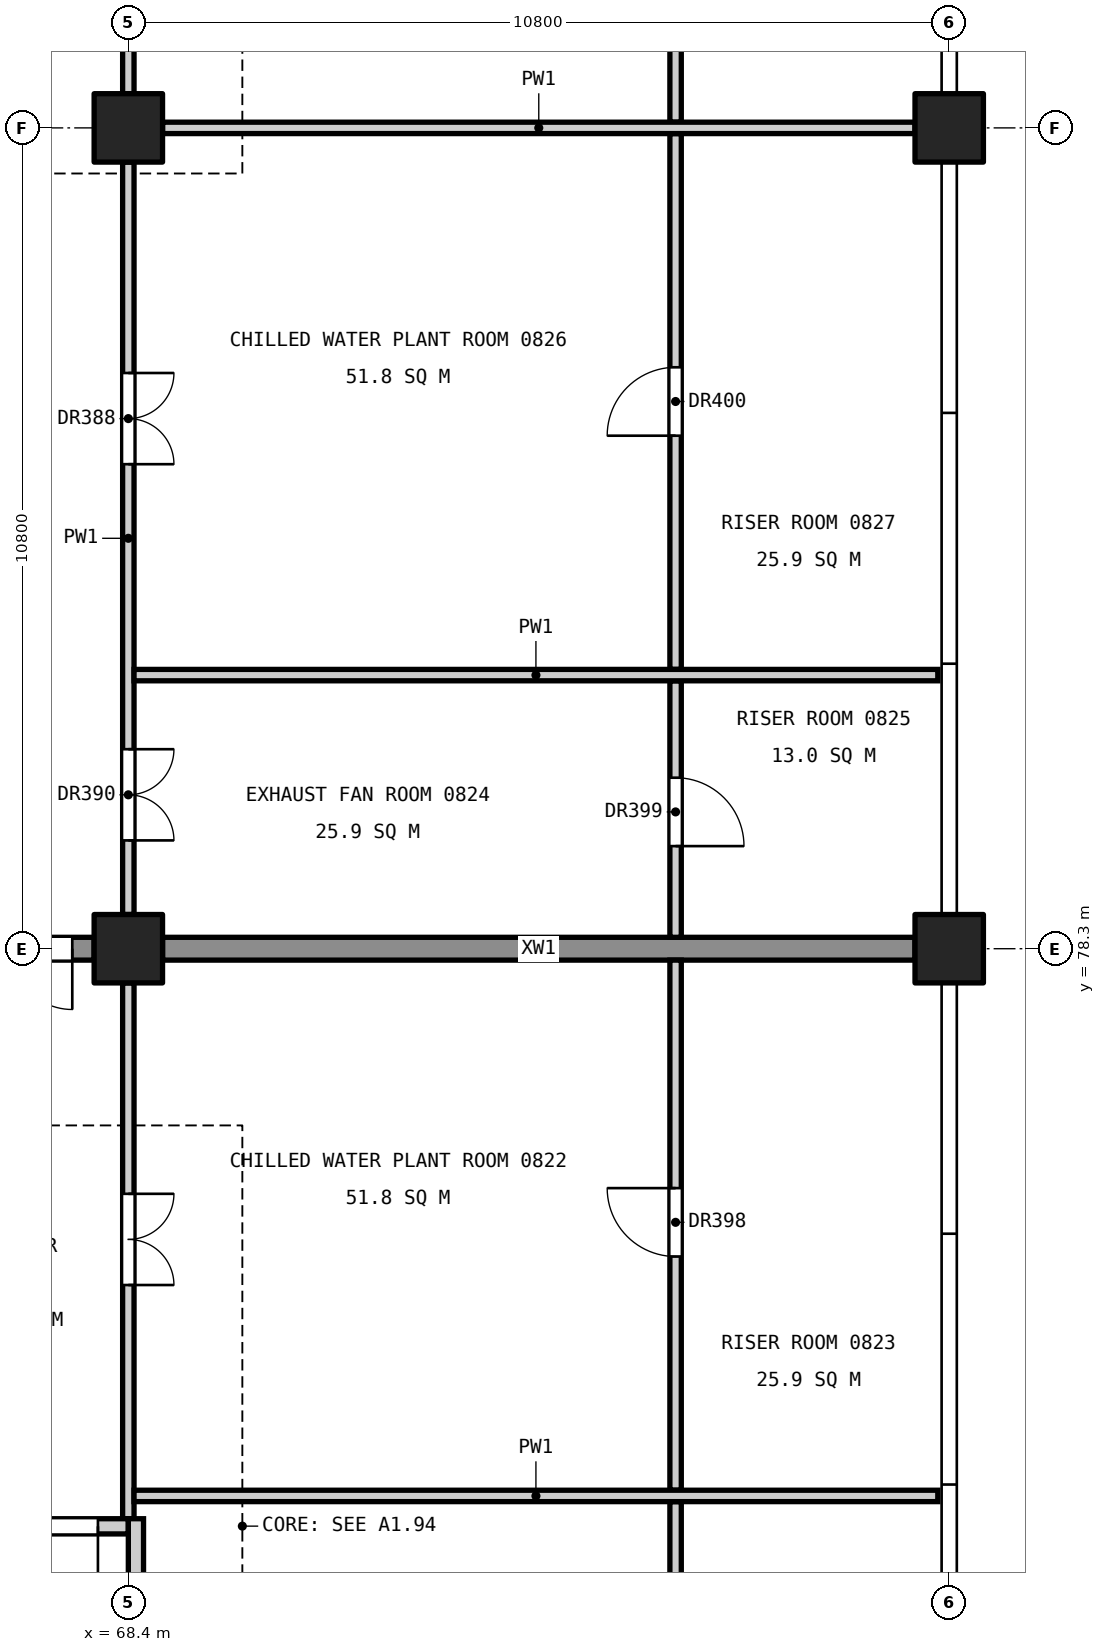
"""IFC4 building model, lengths in metres.
Left out: names, types, materials, properties, quantities, classifications, styles, units other than length and angle.
Written with IfcOpenShell. Run it as: python <this file> out.ifc"""

import sys

from ifc_helpers import new_model, si_unit, direction, frame, frame_2d, origin, origin_2d, place, context, subcontext, project, spatial, rectangle, extrude, element, fill, save


model = new_model("IFC4")
c1 = context("Model", 3, precision=1e-05, world=origin(), true_north=direction((0.0, 1.0)))
c2 = subcontext(c1, "Body", "Model", "MODEL_VIEW")
j1 = project(units=[si_unit("LENGTHUNIT", "METRE"), si_unit("PLANEANGLEUNIT", "RADIAN")], contexts=[c1])
p1 = place(None, origin())
s1 = spatial("IfcSite", under=j1, at=p1, CompositionType="ELEMENT")
p2 = place(p1, origin())
s2 = spatial("IfcBuilding", under=s1, at=p2, CompositionType="ELEMENT")
p3 = place(p2, frame((0.0, 0.0, 41.4)))
s3 = spatial("IfcBuildingStorey", under=s2, at=p3, CompositionType="ELEMENT", Elevation=41.4)
for number, where, z_axis, x_axis in (
    (1, (68.4, 78.3, 0.0), (0.0, 0.0, 1.0), (1.0, 0.0, 0.0)),
    (2, (68.4, 89.1, 0.0), (0.0, 0.0, 1.0), (1.0, 0.0, 0.0)),
    (3, (79.2, 78.3, 0.0), (0.0, 0.0, 1.0), (1.0, 0.0, 0.0)),
    (4, (79.2, 89.1, 0.0), (0.0, 0.0, 1.0), (1.0, 0.0, 0.0)),
):
    element("IfcColumn", number, at=place(p3, frame(where, z_axis=z_axis, x_axis=x_axis)), inside=s3, PredefinedType="COLUMN", context=c2, shape_type="SweptSolid", body=[
        extrude(rectangle(XDim=0.9, YDim=0.9, at=origin_2d()), origin(), (0.0, 0.0, 1.0), 4.8),
    ])
p4 = place(p3, frame((61.65, 78.3, 0.0), z_axis=(0.0, 0.0, 1.0), x_axis=(1.0, 0.0, 0.0)))
e5 = element("IfcWall", 5, at=p4, inside=s3, PredefinedType="SHEAR", context=c2, shape_type="SweptSolid", body=[
    extrude(rectangle(XDim=6.3, YDim=0.3, at=frame_2d((3.15, 0.0))), origin(), (0.0, 0.0, 1.0), 4.55),
])
p5 = place(p4, frame((4.413, 0.0, 0.0)))
e6 = element("IfcOpeningElement", 6, at=p5, cuts=e5, PredefinedType="OPENING", context=c2, shape_type="SweptSolid", body=[
    extrude(rectangle(XDim=1.6, YDim=2.1, at=frame_2d((0.8, 1.05))), frame((0.0, 0.16, 0.0), z_axis=(0.0, -1.0, 0.0), x_axis=(1.0, 0.0, 0.0)), (0.0, 0.0, 1.0), 0.32),
])
p6 = place(p3, frame((68.85, 78.3, 0.0), z_axis=(0.0, 0.0, 1.0), x_axis=(1.0, 0.0, 0.0)))
e7 = element("IfcWall", 7, at=p6, inside=s3, PredefinedType="SHEAR", context=c2, shape_type="SweptSolid", body=[
    extrude(rectangle(XDim=9.9, YDim=0.3, at=frame_2d((4.95, 0.0))), origin(), (0.0, 0.0, 1.0), 4.55),
])
p7 = place(p3, frame((68.4, 70.8, 0.0), z_axis=(0.0, 0.0, 1.0), x_axis=(0.0, 1.0, 0.0)))
e8 = element("IfcWall", 8, at=p7, inside=s3, PredefinedType="PARTITIONING", context=c2, shape_type="SweptSolid", body=[
    extrude(rectangle(XDim=7.05, YDim=0.15, at=frame_2d((3.525, 0.0))), origin(), (0.0, 0.0, 1.0), 3.55),
])
p8 = place(p7, frame((3.075, 0.0, 0.0)))
e9 = element("IfcOpeningElement", 9, at=p8, cuts=e8, PredefinedType="OPENING", context=c2, shape_type="SweptSolid", body=[
    extrude(rectangle(XDim=1.2, YDim=2.1, at=frame_2d((0.6, 1.05))), frame((0.0, 0.085, 0.0), z_axis=(0.0, -1.0, 0.0), x_axis=(1.0, 0.0, 0.0)), (0.0, 0.0, 1.0), 0.17),
])
p9 = place(p3, frame((68.4, 78.75, 0.0), z_axis=(0.0, 0.0, 1.0), x_axis=(0.0, 1.0, 0.0)))
e10 = element("IfcWall", 10, at=p9, inside=s3, PredefinedType="PARTITIONING", context=c2, shape_type="SweptSolid", body=[
    extrude(rectangle(XDim=9.9, YDim=0.15, at=frame_2d((4.95, 0.0))), origin(), (0.0, 0.0, 1.0), 3.55),
])
p10 = place(p9, frame((5.925, 0.0, 0.0)))
e11 = element("IfcOpeningElement", 11, at=p10, cuts=e10, PredefinedType="OPENING", context=c2, shape_type="SweptSolid", body=[
    extrude(rectangle(XDim=1.2, YDim=2.1, at=frame_2d((0.6, 1.05))), frame((0.0, 0.085, 0.0), z_axis=(0.0, -1.0, 0.0), x_axis=(1.0, 0.0, 0.0)), (0.0, 0.0, 1.0), 0.17),
])
p11 = place(p9, frame((0.975, 0.0, 0.0)))
e12 = element("IfcOpeningElement", 12, at=p11, cuts=e10, PredefinedType="OPENING", context=c2, shape_type="SweptSolid", body=[
    extrude(rectangle(XDim=1.2, YDim=2.1, at=frame_2d((0.6, 1.05))), frame((0.0, 0.085, 0.0), z_axis=(0.0, -1.0, 0.0), x_axis=(1.0, 0.0, 0.0)), (0.0, 0.0, 1.0), 0.17),
])
p12 = place(p3, frame((68.4, 89.55, 0.0), z_axis=(0.0, 0.0, 1.0), x_axis=(0.0, 1.0, 0.0)))
e13 = element("IfcWall", 13, at=p12, inside=s3, PredefinedType="PARTITIONING", context=c2, shape_type="SweptSolid", body=[
    extrude(rectangle(XDim=3.55, YDim=0.15, at=frame_2d((1.775, 0.0))), origin(), (0.0, 0.0, 1.0), 3.55),
])
p13 = place(p12, frame((1.175, 0.0, 0.0)))
e14 = element("IfcOpeningElement", 14, at=p13, cuts=e13, PredefinedType="OPENING", context=c2, shape_type="SweptSolid", body=[
    extrude(rectangle(XDim=1.2, YDim=2.1, at=frame_2d((0.6, 1.05))), frame((0.0, 0.085, 0.0), z_axis=(0.0, -1.0, 0.0), x_axis=(1.0, 0.0, 0.0)), (0.0, 0.0, 1.0), 0.17),
])
p14 = place(p3, frame((65.9, 70.7, 0.0), z_axis=(0.0, 0.0, 1.0), x_axis=(1.0, 0.0, 0.0)))
e15 = element("IfcWall", 15, at=p14, inside=s3, PredefinedType="PARTITIONING", context=c2, shape_type="SweptSolid", body=[
    extrude(rectangle(XDim=2.5, YDim=0.2, at=frame_2d((1.25, 0.0))), origin(), (0.0, 0.0, 1.0), 3.55),
])
p15 = place(p14, frame((0.9, 0.0, 0.0)))
e16 = element("IfcOpeningElement", 16, at=p15, cuts=e15, PredefinedType="OPENING", context=c2, shape_type="SweptSolid", body=[
    extrude(rectangle(XDim=1.2, YDim=2.1, at=frame_2d((0.6, 1.05))), frame((0.0, 0.11, 0.0), z_axis=(0.0, -1.0, 0.0), x_axis=(1.0, 0.0, 0.0)), (0.0, 0.0, 1.0), 0.22),
])
p16 = place(p3, frame((68.5, 67.95, 0.0), z_axis=(0.0, 0.0, 1.0), x_axis=(0.0, 1.0, 0.0)))
e17 = element("IfcWall", 17, at=p16, inside=s3, PredefinedType="PARTITIONING", context=c2, shape_type="SweptSolid", body=[
    extrude(rectangle(XDim=2.85, YDim=0.2, at=frame_2d((1.425, 0.0))), origin(), (0.0, 0.0, 1.0), 3.55),
])
p17 = place(p3, frame((75.6, 56.85, 0.0), z_axis=(0.0, 0.0, 1.0), x_axis=(0.0, 1.0, 0.0)))
e18 = element("IfcWall", 18, at=p17, inside=s3, PredefinedType="PARTITIONING", context=c2, shape_type="SweptSolid", body=[
    extrude(rectangle(XDim=14.175, YDim=0.15, at=frame_2d((7.087, 0.0))), origin(), (0.0, 0.0, 1.0), 3.55),
])
p18 = place(p17, frame((6.6, 0.0, 0.0)))
e19 = element("IfcOpeningElement", 19, at=p18, cuts=e18, PredefinedType="OPENING", context=c2, shape_type="SweptSolid", body=[
    extrude(rectangle(XDim=0.9, YDim=2.1, at=frame_2d((0.45, 1.05))), frame((0.0, 0.085, 0.0), z_axis=(0.0, -1.0, 0.0), x_axis=(1.0, 0.0, 0.0)), (0.0, 0.0, 1.0), 0.17),
])
p19 = place(p3, frame((75.6, 71.175, 0.0), z_axis=(0.0, 0.0, 1.0), x_axis=(0.0, 1.0, 0.0)))
e20 = element("IfcWall", 20, at=p19, inside=s3, PredefinedType="PARTITIONING", context=c2, shape_type="SweptSolid", body=[
    extrude(rectangle(XDim=6.975, YDim=0.15, at=frame_2d((3.487, 0.0))), origin(), (0.0, 0.0, 1.0), 3.55),
])
p20 = place(p19, frame((3.075, 0.0, 0.0)))
e21 = element("IfcOpeningElement", 21, at=p20, cuts=e20, PredefinedType="OPENING", context=c2, shape_type="SweptSolid", body=[
    extrude(rectangle(XDim=0.9, YDim=2.1, at=frame_2d((0.45, 1.05))), frame((0.0, 0.085, 0.0), z_axis=(0.0, -1.0, 0.0), x_axis=(1.0, 0.0, 0.0)), (0.0, 0.0, 1.0), 0.17),
])
p21 = place(p3, frame((75.6, 78.45, 0.0), z_axis=(0.0, 0.0, 1.0), x_axis=(0.0, 1.0, 0.0)))
e22 = element("IfcWall", 22, at=p21, inside=s3, PredefinedType="PARTITIONING", context=c2, shape_type="SweptSolid", body=[
    extrude(rectangle(XDim=3.375, YDim=0.15, at=frame_2d((1.688, 0.0))), origin(), (0.0, 0.0, 1.0), 3.55),
])
p22 = place(p21, frame((1.2, 0.0, 0.0)))
e23 = element("IfcOpeningElement", 23, at=p22, cuts=e22, PredefinedType="OPENING", context=c2, shape_type="SweptSolid", body=[
    extrude(rectangle(XDim=0.9, YDim=2.1, at=frame_2d((0.45, 1.05))), frame((0.0, 0.085, 0.0), z_axis=(0.0, -1.0, 0.0), x_axis=(1.0, 0.0, 0.0)), (0.0, 0.0, 1.0), 0.17),
])
p23 = place(p3, frame((75.6, 81.975, 0.0), z_axis=(0.0, 0.0, 1.0), x_axis=(0.0, 1.0, 0.0)))
e24 = element("IfcWall", 24, at=p23, inside=s3, PredefinedType="PARTITIONING", context=c2, shape_type="SweptSolid", body=[
    extrude(rectangle(XDim=7.05, YDim=0.15, at=frame_2d((3.525, 0.0))), origin(), (0.0, 0.0, 1.0), 3.55),
])
p24 = place(p23, frame((3.075, 0.0, 0.0)))
e25 = element("IfcOpeningElement", 25, at=p24, cuts=e24, PredefinedType="OPENING", context=c2, shape_type="SweptSolid", body=[
    extrude(rectangle(XDim=0.9, YDim=2.1, at=frame_2d((0.45, 1.05))), frame((0.0, 0.085, 0.0), z_axis=(0.0, -1.0, 0.0), x_axis=(1.0, 0.0, 0.0)), (0.0, 0.0, 1.0), 0.17),
])
p25 = place(p3, frame((75.6, 89.175, 0.0), z_axis=(0.0, 0.0, 1.0), x_axis=(0.0, 1.0, 0.0)))
e26 = element("IfcWall", 26, at=p25, inside=s3, PredefinedType="PARTITIONING", context=c2, shape_type="SweptSolid", body=[
    extrude(rectangle(XDim=10.575, YDim=0.15, at=frame_2d((5.288, 0.0))), origin(), (0.0, 0.0, 1.0), 3.55),
])
p26 = place(p25, frame((4.875, 0.0, 0.0)))
e27 = element("IfcOpeningElement", 27, at=p26, cuts=e26, PredefinedType="OPENING", context=c2, shape_type="SweptSolid", body=[
    extrude(rectangle(XDim=0.9, YDim=2.1, at=frame_2d((0.45, 1.05))), frame((0.0, 0.085, 0.0), z_axis=(0.0, -1.0, 0.0), x_axis=(1.0, 0.0, 0.0)), (0.0, 0.0, 1.0), 0.17),
])
for number, where, z_axis, x_axis in (
    (28, (68.475, 71.1, 0.0), (0.0, 0.0, 1.0), (1.0, 0.0, 0.0)),
    (29, (68.475, 81.9, 0.0), (0.0, 0.0, 1.0), (1.0, 0.0, 0.0)),
):
    element("IfcWall", number, at=place(p3, frame(where, z_axis=z_axis, x_axis=x_axis)), inside=s3, PredefinedType="PARTITIONING", context=c2, shape_type="SweptSolid", body=[
        extrude(rectangle(XDim=10.575, YDim=0.15, at=frame_2d((5.288, 0.0))), origin(), (0.0, 0.0, 1.0), 3.85),
    ])
p27 = place(p3, frame((68.85, 89.1, 0.0), z_axis=(0.0, 0.0, 1.0), x_axis=(1.0, 0.0, 0.0)))
e30 = element("IfcWall", 30, at=p27, inside=s3, PredefinedType="PARTITIONING", context=c2, shape_type="SweptSolid", body=[
    extrude(rectangle(XDim=9.9, YDim=0.15, at=frame_2d((4.95, 0.0))), origin(), (0.0, 0.0, 1.0), 3.85),
])
p28 = place(p8, frame((1.2, 0.0, 0.0), z_axis=(0.0, 0.0, 1.0), x_axis=(-1.0, 0.0, 0.0)))
e31 = element("IfcDoor", 31, at=p28, inside=s3, OperationType="DOUBLE_DOOR_SINGLE_SWING", PredefinedType="DOOR", context=c2, shape_type="SweptSolid", body=[
    extrude(rectangle(XDim=1.2, YDim=2.1, at=frame_2d((0.6, 1.05))), frame((0.0, 0.025, 0.0), z_axis=(0.0, -1.0, 0.0), x_axis=(1.0, 0.0, 0.0)), (0.0, 0.0, 1.0), 0.05),
])
fill(e9, e31)
p29 = place(p10, frame((1.2, 0.0, 0.0), z_axis=(0.0, 0.0, 1.0), x_axis=(-1.0, 0.0, 0.0)))
e32 = element("IfcDoor", 32, at=p29, inside=s3, OperationType="DOUBLE_DOOR_SINGLE_SWING", PredefinedType="DOOR", context=c2, shape_type="SweptSolid", body=[
    extrude(rectangle(XDim=1.2, YDim=2.1, at=frame_2d((0.6, 1.05))), frame((0.0, 0.025, 0.0), z_axis=(0.0, -1.0, 0.0), x_axis=(1.0, 0.0, 0.0)), (0.0, 0.0, 1.0), 0.05),
])
fill(e11, e32)
p30 = place(p11, frame((1.2, 0.0, 0.0), z_axis=(0.0, 0.0, 1.0), x_axis=(-1.0, 0.0, 0.0)))
e33 = element("IfcDoor", 33, at=p30, inside=s3, OperationType="DOUBLE_DOOR_SINGLE_SWING", PredefinedType="DOOR", context=c2, shape_type="SweptSolid", body=[
    extrude(rectangle(XDim=1.2, YDim=2.1, at=frame_2d((0.6, 1.05))), frame((0.0, 0.025, 0.0), z_axis=(0.0, -1.0, 0.0), x_axis=(1.0, 0.0, 0.0)), (0.0, 0.0, 1.0), 0.05),
])
fill(e12, e33)
p31 = place(p20, origin())
e34 = element("IfcDoor", 34, at=p31, inside=s3, OperationType="SINGLE_SWING_RIGHT", PredefinedType="DOOR", context=c2, shape_type="SweptSolid", body=[
    extrude(rectangle(XDim=0.9, YDim=2.1, at=frame_2d((0.45, 1.05))), frame((0.0, 0.025, 0.0), z_axis=(0.0, -1.0, 0.0), x_axis=(1.0, 0.0, 0.0)), (0.0, 0.0, 1.0), 0.05),
])
fill(e21, e34)
p32 = place(p22, frame((0.9, 0.0, 0.0), z_axis=(0.0, 0.0, 1.0), x_axis=(-1.0, 0.0, 0.0)))
e35 = element("IfcDoor", 35, at=p32, inside=s3, OperationType="SINGLE_SWING_RIGHT", PredefinedType="DOOR", context=c2, shape_type="SweptSolid", body=[
    extrude(rectangle(XDim=0.9, YDim=2.1, at=frame_2d((0.45, 1.05))), frame((0.0, 0.025, 0.0), z_axis=(0.0, -1.0, 0.0), x_axis=(1.0, 0.0, 0.0)), (0.0, 0.0, 1.0), 0.05),
])
fill(e23, e35)
p33 = place(p24, origin())
e36 = element("IfcDoor", 36, at=p33, inside=s3, OperationType="SINGLE_SWING_LEFT", PredefinedType="DOOR", context=c2, shape_type="SweptSolid", body=[
    extrude(rectangle(XDim=0.9, YDim=2.1, at=frame_2d((0.45, 1.05))), frame((0.0, 0.025, 0.0), z_axis=(0.0, -1.0, 0.0), x_axis=(1.0, 0.0, 0.0)), (0.0, 0.0, 1.0), 0.05),
])
fill(e25, e36)
p34 = place(p15, frame((1.2, 0.0, 0.0), z_axis=(0.0, 0.0, 1.0), x_axis=(-1.0, 0.0, 0.0)))
e37 = element("IfcDoor", 37, at=p34, inside=s3, OperationType="SINGLE_SWING_LEFT", PredefinedType="DOOR", context=c2, shape_type="SweptSolid", body=[
    extrude(rectangle(XDim=1.2, YDim=2.1, at=frame_2d((0.6, 1.05))), frame((0.0, 0.025, 0.0), z_axis=(0.0, -1.0, 0.0), x_axis=(1.0, 0.0, 0.0)), (0.0, 0.0, 1.0), 0.05),
])
fill(e16, e37)
p35 = place(p5, frame((1.6, 0.0, 0.0), z_axis=(0.0, 0.0, 1.0), x_axis=(-1.0, 0.0, 0.0)))
e38 = element("IfcDoor", 38, at=p35, inside=s3, OperationType="DOUBLE_DOOR_SINGLE_SWING", PredefinedType="DOOR", context=c2, shape_type="SweptSolid", body=[
    extrude(rectangle(XDim=1.6, YDim=2.1, at=frame_2d((0.8, 1.05))), frame((0.0, 0.025, 0.0), z_axis=(0.0, -1.0, 0.0), x_axis=(1.0, 0.0, 0.0)), (0.0, 0.0, 1.0), 0.05),
])
fill(e6, e38)
save(model, sys.argv[1])
